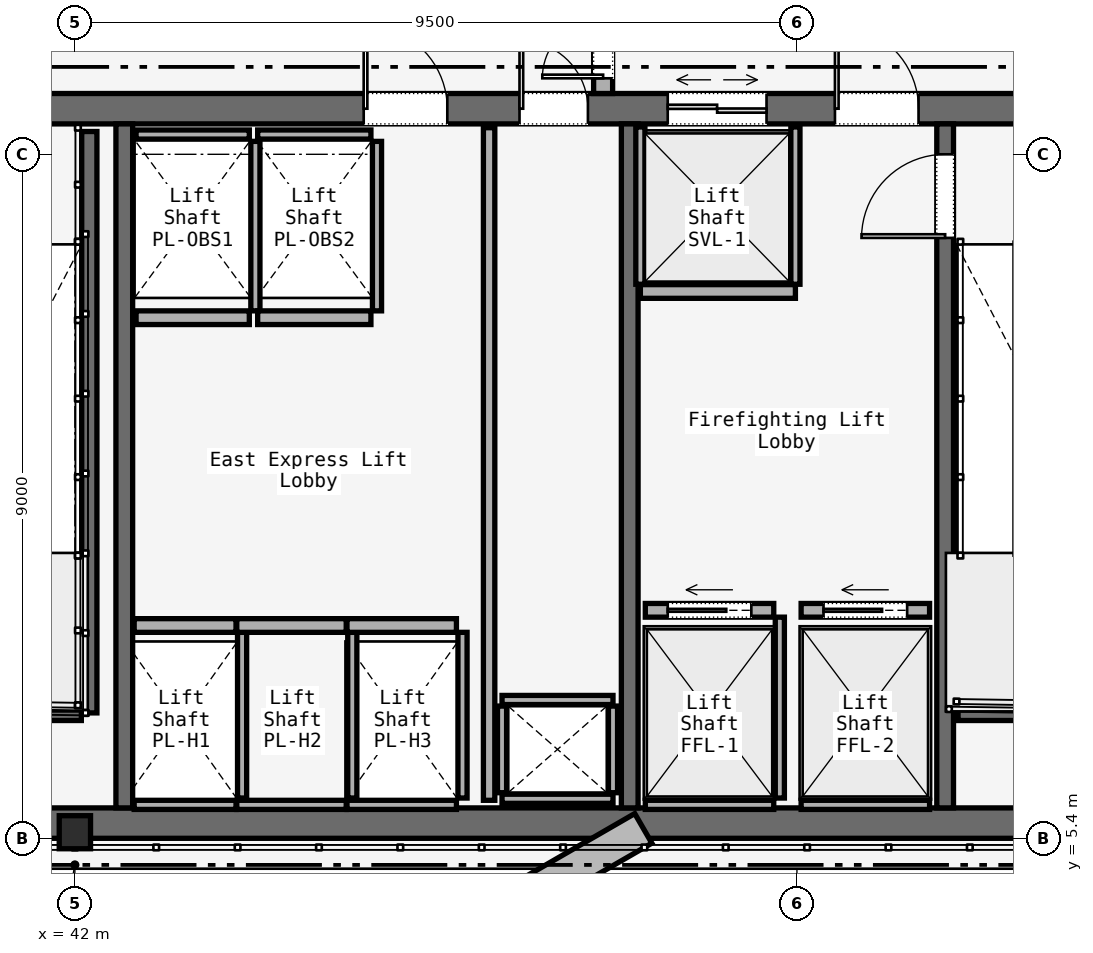
"""IFC4 building model, lengths in metres.
Left out: names, types, materials, properties, quantities, classifications, styles, units other than length and angle.
Written with IfcOpenShell. Run it as: python <this file> out.ifc"""

import sys

from ifc_helpers import new_model, si_unit, direction, frame, frame_2d, origin, origin_2d, place, context, subcontext, project, spatial, rectangle, i_section, extrude, element, fill, save


model = new_model("IFC4")
c1 = context("Model", 3, precision=1e-05, world=origin(), true_north=direction((0.0, 1.0)))
c2 = subcontext(c1, "Body", "Model", "MODEL_VIEW")
j1 = project(units=[si_unit("LENGTHUNIT", "METRE"), si_unit("PLANEANGLEUNIT", "RADIAN")], contexts=[c1])
p1 = place(None, origin())
s1 = spatial("IfcSite", under=j1, at=p1, CompositionType="ELEMENT")
p2 = place(p1, origin())
s2 = spatial("IfcBuilding", under=s1, at=p2, CompositionType="ELEMENT")
p3 = place(p2, frame((0.0, 0.0, 203.0)))
s3 = spatial("IfcBuildingStorey", under=s2, at=p3, CompositionType="ELEMENT", Elevation=203.0)
p4 = place(p3, frame((26.45, 15.0, 0.0), z_axis=(0.0, 0.0, 1.0), x_axis=(1.0, 0.0, 0.0)))
e1 = element("IfcWall", 1, at=p4, inside=s3, PredefinedType="SOLIDWALL", context=c2, shape_type="SweptSolid", body=[
    extrude(rectangle(XDim=31.1, YDim=0.4, at=frame_2d((15.55, 0.0))), origin(), (0.0, 0.0, 1.0), 5.12),
])
p5 = place(p4, frame((1.65, 0.0, 0.0)))
e2 = element("IfcOpeningElement", 2, at=p5, cuts=e1, PredefinedType="OPENING", context=c2, shape_type="SweptSolid", body=[
    extrude(rectangle(XDim=1.1, YDim=2.2, at=frame_2d((0.55, 1.1))), frame((0.0, 0.2, 0.0), z_axis=(0.0, -1.0, 0.0), x_axis=(1.0, 0.0, 0.0)), (0.0, 0.0, 1.0), 0.4),
])
p6 = place(p4, frame((13.65, 0.0, 0.0)))
e3 = element("IfcOpeningElement", 3, at=p6, cuts=e1, PredefinedType="OPENING", context=c2, shape_type="SweptSolid", body=[
    extrude(rectangle(XDim=1.1, YDim=2.2, at=frame_2d((0.55, 1.1))), frame((0.0, 0.2, 0.0), z_axis=(0.0, -1.0, 0.0), x_axis=(1.0, 0.0, 0.0)), (0.0, 0.0, 1.0), 0.4),
])
p7 = place(p4, frame((25.55, 0.0, 0.0)))
e4 = element("IfcOpeningElement", 4, at=p7, cuts=e1, PredefinedType="OPENING", context=c2, shape_type="SweptSolid", body=[
    extrude(rectangle(XDim=1.1, YDim=2.2, at=frame_2d((0.55, 1.1))), frame((0.0, 0.2, 0.0), z_axis=(0.0, -1.0, 0.0), x_axis=(1.0, 0.0, 0.0)), (0.0, 0.0, 1.0), 0.4),
])
p8 = place(p4, frame((10.7, 0.0, 0.0)))
e5 = element("IfcOpeningElement", 5, at=p8, cuts=e1, PredefinedType="OPENING", context=c2, shape_type="SweptSolid", body=[
    extrude(rectangle(XDim=1.4, YDim=2.2, at=frame_2d((0.7, 1.1))), frame((0.0, 0.2, 0.0), z_axis=(0.0, -1.0, 0.0), x_axis=(1.0, 0.0, 0.0)), (0.0, 0.0, 1.0), 0.4),
])
p9 = place(p4, frame((19.35, 0.0, 0.0)))
e6 = element("IfcOpeningElement", 6, at=p9, cuts=e1, PredefinedType="OPENING", context=c2, shape_type="SweptSolid", body=[
    extrude(rectangle(XDim=1.1, YDim=2.2, at=frame_2d((0.55, 1.1))), frame((0.0, 0.2, 0.0), z_axis=(0.0, -1.0, 0.0), x_axis=(1.0, 0.0, 0.0)), (0.0, 0.0, 1.0), 0.4),
])
p10 = place(p4, frame((21.4, 0.0, 0.0)))
e7 = element("IfcOpeningElement", 7, at=p10, cuts=e1, PredefinedType="OPENING", context=c2, shape_type="SweptSolid", body=[
    extrude(rectangle(XDim=0.9, YDim=2.1, at=frame_2d((0.45, 1.05))), frame((0.0, 0.2, 0.0), z_axis=(0.0, -1.0, 0.0), x_axis=(1.0, 0.0, 0.0)), (0.0, 0.0, 1.0), 0.4),
])
p11 = place(p4, frame((23.35, 0.0, 0.0)))
e8 = element("IfcOpeningElement", 8, at=p11, cuts=e1, PredefinedType="OPENING", context=c2, shape_type="SweptSolid", body=[
    extrude(rectangle(XDim=1.3, YDim=2.3, at=frame_2d((0.65, 1.15))), frame((0.0, 0.2, 0.0), z_axis=(0.0, -1.0, 0.0), x_axis=(1.0, 0.0, 0.0)), (0.0, 0.0, 1.0), 0.4),
])
p12 = place(p3, frame((26.45, 5.6, 0.0), z_axis=(0.0, 0.0, 1.0), x_axis=(1.0, 0.0, 0.0)))
e9 = element("IfcWall", 9, at=p12, inside=s3, PredefinedType="SOLIDWALL", context=c2, shape_type="SweptSolid", body=[
    extrude(rectangle(XDim=31.1, YDim=0.4, at=frame_2d((15.55, 0.0))), origin(), (0.0, 0.0, 1.0), 5.12),
])
for number, where, z_axis, x_axis in (
    (10, (42.65, 5.8, 0.0), (0.0, 0.0, 1.0), (0.0, 1.0, 0.0)),
    (11, (49.3, 5.8, 0.0), (0.0, 0.0, 1.0), (0.0, 1.0, 0.0)),
):
    element("IfcWall", number, at=place(p3, frame(where, z_axis=z_axis, x_axis=x_axis)), inside=s3, PredefinedType="SOLIDWALL", context=c2, shape_type="SweptSolid", body=[
        extrude(rectangle(XDim=9.0, YDim=0.22, at=frame_2d((4.5, 0.0))), origin(), (0.0, 0.0, 1.0), 5.12),
    ])
p13 = place(p3, frame((53.45, 5.8, 0.0), z_axis=(0.0, 0.0, 1.0), x_axis=(0.0, 1.0, 0.0)))
e12 = element("IfcWall", 12, at=p13, inside=s3, PredefinedType="SOLIDWALL", context=c2, shape_type="SweptSolid", body=[
    extrude(rectangle(XDim=9.0, YDim=0.22, at=frame_2d((4.5, 0.0))), origin(), (0.0, 0.0, 1.0), 5.12),
])
p14 = place(p13, frame((7.5, 0.0, 0.0)))
e13 = element("IfcOpeningElement", 13, at=p14, cuts=e12, PredefinedType="OPENING", context=c2, shape_type="SweptSolid", body=[
    extrude(rectangle(XDim=1.1, YDim=2.2, at=frame_2d((0.55, 1.1))), frame((0.0, 0.11, 0.0), z_axis=(0.0, -1.0, 0.0), x_axis=(1.0, 0.0, 0.0)), (0.0, 0.0, 1.0), 0.22),
])
p15 = place(p3, frame((42.0, 5.48, 0.0), z_axis=(0.0, 0.0, 1.0), x_axis=(1.0, 0.0, 0.0)))
e14 = element("IfcColumn", 14, at=p15, inside=s3, PredefinedType="COLUMN", context=c2, shape_type="SweptSolid", body=[
    extrude(i_section(OverallWidth=0.412, OverallDepth=0.435, WebThickness=0.036, FlangeThickness=0.044, FilletRadius=0.015, at=origin_2d()), origin(), (0.0, 0.0, 1.0), 5.12),
])
p16 = place(p3, frame((48.95, 15.2, 0.0), z_axis=(0.0, 0.0, 1.0), x_axis=(0.0, 1.0, 0.0)))
e15 = element("IfcWall", 15, at=p16, inside=s3, PredefinedType="SOLIDWALL", context=c2, shape_type="SweptSolid", body=[
    extrude(rectangle(XDim=19.8, YDim=0.25, at=frame_2d((9.9, 0.0))), origin(), (0.0, 0.0, 1.0), 3.99),
])
p17 = place(p16, frame((0.2, 0.0, 0.0)))
e16 = element("IfcOpeningElement", 16, at=p17, cuts=e15, PredefinedType="OPENING", context=c2, shape_type="SweptSolid", body=[
    extrude(rectangle(XDim=1.6, YDim=2.3, at=frame_2d((0.8, 1.15))), frame((0.0, 0.125, 0.0), z_axis=(0.0, -1.0, 0.0), x_axis=(1.0, 0.0, 0.0)), (0.0, 0.0, 1.0), 0.25),
])
p18 = place(p3, frame((42.19, 14.7, 0.0), z_axis=(0.0, 0.0, 1.0), x_axis=(0.0, -1.0, 0.0)))
e17 = element("IfcWall", 17, at=p18, inside=s3, PredefinedType="SOLIDWALL", context=c2, shape_type="SweptSolid", body=[
    extrude(rectangle(XDim=7.65, YDim=0.2, at=frame_2d((3.825, 0.0))), origin(), (0.0, 0.0, 1.0), 5.4),
])
for number, where, z_axis, x_axis in (
    (18, (38.97, 7.05, 0.0), (0.0, 0.0, 1.0), (1.0, 0.0, 0.0)),
    (19, (53.62, 7.05, 0.0), (0.0, 0.0, 1.0), (1.0, 0.0, 0.0)),
):
    element("IfcWall", number, at=place(p3, frame(where, z_axis=z_axis, x_axis=x_axis)), inside=s3, PredefinedType="SOLIDWALL", context=c2, shape_type="SweptSolid", body=[
        extrude(rectangle(XDim=3.115, YDim=0.2, at=frame_2d((1.558, 0.0))), origin(), (0.0, 0.0, 1.0), 5.4),
    ])
for number, where, z_axis, x_axis in (
    (20, (47.62, 5.92, 0.0), (0.0, 0.0, 1.0), (1.0, 0.0, 0.0)),
    (21, (47.62, 7.22, 0.0), (0.0, 0.0, 1.0), (1.0, 0.0, 0.0)),
):
    element("IfcWall", number, at=place(p3, frame(where, z_axis=z_axis, x_axis=x_axis)), inside=s3, PredefinedType="SOLIDWALL", context=c2, shape_type="SweptSolid", body=[
        extrude(rectangle(XDim=1.46, YDim=0.12, at=frame_2d((0.73, 0.0))), origin(), (0.0, 0.0, 1.0), 3.99),
    ])
for number, where, z_axis, x_axis in (
    (22, (47.62, 6.0, 0.0), (0.0, 0.0, 1.0), (0.0, 1.0, 0.0)),
    (23, (49.08, 6.0, 0.0), (0.0, 0.0, 1.0), (0.0, 1.0, 0.0)),
):
    element("IfcWall", number, at=place(p3, frame(where, z_axis=z_axis, x_axis=x_axis)), inside=s3, PredefinedType="SOLIDWALL", context=c2, shape_type="SweptSolid", body=[
        extrude(rectangle(XDim=1.14, YDim=0.12, at=frame_2d((0.57, 0.0))), origin(), (0.0, 0.0, 1.0), 3.99),
    ])
p19 = place(p3, frame((47.45, 5.9, 0.0), z_axis=(0.0, 0.0, 1.0), x_axis=(0.0, 1.0, 0.0)))
e24 = element("IfcWall", 24, at=p19, inside=s3, PredefinedType="PARTITIONING", context=c2, shape_type="SweptSolid", body=[
    extrude(rectangle(XDim=8.85, YDim=0.15, at=frame_2d((4.425, 0.0))), origin(), (0.0, 0.0, 1.0), 3.99),
])
p20 = place(p3, frame((42.78, 8.2, 0.0), z_axis=(0.0, 0.0, 1.0), x_axis=(1.0, 0.0, 0.0)))
e25 = element("IfcWall", 25, at=p20, inside=s3, PredefinedType="SOLIDWALL", context=c2, shape_type="SweptSolid", body=[
    extrude(rectangle(XDim=1.34, YDim=0.18, at=frame_2d((0.67, 0.0))), origin(), (0.0, 0.0, 1.0), 3.99),
])
p21 = place(p3, frame((42.78, 5.84, 0.0), z_axis=(0.0, 0.0, 1.0), x_axis=(1.0, 0.0, 0.0)))
e26 = element("IfcWall", 26, at=p21, inside=s3, PredefinedType="SOLIDWALL", context=c2, shape_type="SweptSolid", body=[
    extrude(rectangle(XDim=1.34, YDim=0.12, at=frame_2d((0.67, 0.0))), origin(), (0.0, 0.0, 1.0), 3.99),
])
p22 = place(p3, frame((44.2, 5.93, 0.0), z_axis=(0.0, 0.0, 1.0), x_axis=(0.0, 1.0, 0.0)))
e27 = element("IfcWall", 27, at=p22, inside=s3, PredefinedType="SOLIDWALL", context=c2, shape_type="SweptSolid", body=[
    extrude(rectangle(XDim=2.18, YDim=0.12, at=frame_2d((1.09, 0.0))), origin(), (0.0, 0.0, 1.0), 3.99),
])
p23 = place(p3, frame((44.13, 8.2, 0.0), z_axis=(0.0, 0.0, 1.0), x_axis=(1.0, 0.0, 0.0)))
e28 = element("IfcWall", 28, at=p23, inside=s3, PredefinedType="SOLIDWALL", context=c2, shape_type="SweptSolid", body=[
    extrude(rectangle(XDim=1.44, YDim=0.18, at=frame_2d((0.72, 0.0))), origin(), (0.0, 0.0, 1.0), 3.99),
])
p24 = place(p3, frame((44.13, 5.84, 0.0), z_axis=(0.0, 0.0, 1.0), x_axis=(1.0, 0.0, 0.0)))
e29 = element("IfcWall", 29, at=p24, inside=s3, PredefinedType="SOLIDWALL", context=c2, shape_type="SweptSolid", body=[
    extrude(rectangle(XDim=1.44, YDim=0.12, at=frame_2d((0.72, 0.0))), origin(), (0.0, 0.0, 1.0), 3.99),
])
p25 = place(p3, frame((45.65, 5.93, 0.0), z_axis=(0.0, 0.0, 1.0), x_axis=(0.0, 1.0, 0.0)))
e30 = element("IfcWall", 30, at=p25, inside=s3, PredefinedType="SOLIDWALL", context=c2, shape_type="SweptSolid", body=[
    extrude(rectangle(XDim=2.18, YDim=0.12, at=frame_2d((1.09, 0.0))), origin(), (0.0, 0.0, 1.0), 3.99),
])
p26 = place(p3, frame((45.58, 8.2, 0.0), z_axis=(0.0, 0.0, 1.0), x_axis=(1.0, 0.0, 0.0)))
e31 = element("IfcWall", 31, at=p26, inside=s3, PredefinedType="SOLIDWALL", context=c2, shape_type="SweptSolid", body=[
    extrude(rectangle(XDim=1.44, YDim=0.18, at=frame_2d((0.72, 0.0))), origin(), (0.0, 0.0, 1.0), 3.99),
])
p27 = place(p3, frame((45.58, 5.84, 0.0), z_axis=(0.0, 0.0, 1.0), x_axis=(1.0, 0.0, 0.0)))
e32 = element("IfcWall", 32, at=p27, inside=s3, PredefinedType="SOLIDWALL", context=c2, shape_type="SweptSolid", body=[
    extrude(rectangle(XDim=1.44, YDim=0.12, at=frame_2d((0.72, 0.0))), origin(), (0.0, 0.0, 1.0), 3.99),
])
p28 = place(p3, frame((47.1, 5.93, 0.0), z_axis=(0.0, 0.0, 1.0), x_axis=(0.0, 1.0, 0.0)))
e33 = element("IfcWall", 33, at=p28, inside=s3, PredefinedType="SOLIDWALL", context=c2, shape_type="SweptSolid", body=[
    extrude(rectangle(XDim=2.18, YDim=0.12, at=frame_2d((1.09, 0.0))), origin(), (0.0, 0.0, 1.0), 3.99),
])
p29 = place(p3, frame((42.805, 12.25, 0.0), z_axis=(0.0, 0.0, 1.0), x_axis=(1.0, 0.0, 0.0)))
e34 = element("IfcWall", 34, at=p29, inside=s3, PredefinedType="SOLIDWALL", context=c2, shape_type="SweptSolid", body=[
    extrude(rectangle(XDim=1.49, YDim=0.18, at=frame_2d((0.745, 0.0))), origin(), (0.0, 0.0, 1.0), 3.99),
])
p30 = place(p3, frame((42.805, 14.66, 0.0), z_axis=(0.0, 0.0, 1.0), x_axis=(1.0, 0.0, 0.0)))
e35 = element("IfcWall", 35, at=p30, inside=s3, PredefinedType="SOLIDWALL", context=c2, shape_type="SweptSolid", body=[
    extrude(rectangle(XDim=1.49, YDim=0.12, at=frame_2d((0.745, 0.0))), origin(), (0.0, 0.0, 1.0), 3.99),
])
p31 = place(p3, frame((44.375, 12.34, 0.0), z_axis=(0.0, 0.0, 1.0), x_axis=(0.0, 1.0, 0.0)))
e36 = element("IfcWall", 36, at=p31, inside=s3, PredefinedType="SOLIDWALL", context=c2, shape_type="SweptSolid", body=[
    extrude(rectangle(XDim=2.23, YDim=0.12, at=frame_2d((1.115, 0.0))), origin(), (0.0, 0.0, 1.0), 3.99),
])
p32 = place(p3, frame((44.405, 12.25, 0.0), z_axis=(0.0, 0.0, 1.0), x_axis=(1.0, 0.0, 0.0)))
e37 = element("IfcWall", 37, at=p32, inside=s3, PredefinedType="SOLIDWALL", context=c2, shape_type="SweptSolid", body=[
    extrude(rectangle(XDim=1.49, YDim=0.18, at=frame_2d((0.745, 0.0))), origin(), (0.0, 0.0, 1.0), 3.99),
])
p33 = place(p3, frame((44.405, 14.66, 0.0), z_axis=(0.0, 0.0, 1.0), x_axis=(1.0, 0.0, 0.0)))
e38 = element("IfcWall", 38, at=p33, inside=s3, PredefinedType="SOLIDWALL", context=c2, shape_type="SweptSolid", body=[
    extrude(rectangle(XDim=1.49, YDim=0.12, at=frame_2d((0.745, 0.0))), origin(), (0.0, 0.0, 1.0), 3.99),
])
p34 = place(p3, frame((45.975, 12.34, 0.0), z_axis=(0.0, 0.0, 1.0), x_axis=(0.0, 1.0, 0.0)))
e39 = element("IfcWall", 39, at=p34, inside=s3, PredefinedType="SOLIDWALL", context=c2, shape_type="SweptSolid", body=[
    extrude(rectangle(XDim=2.23, YDim=0.12, at=frame_2d((1.115, 0.0))), origin(), (0.0, 0.0, 1.0), 3.99),
])
p35 = place(p3, frame((49.505, 8.4, 0.0), z_axis=(0.0, 0.0, 1.0), x_axis=(1.0, 0.0, 0.0)))
e40 = element("IfcWall", 40, at=p35, inside=s3, PredefinedType="SOLIDWALL", context=c2, shape_type="SweptSolid", body=[
    extrude(rectangle(XDim=1.69, YDim=0.18, at=frame_2d((0.845, 0.0))), origin(), (0.0, 0.0, 1.0), 3.99),
])
p36 = place(p35, frame((0.295, 0.0, 0.0)))
e41 = element("IfcOpeningElement", 41, at=p36, cuts=e40, PredefinedType="OPENING", context=c2, shape_type="SweptSolid", body=[
    extrude(rectangle(XDim=1.1, YDim=2.2, at=frame_2d((0.55, 1.1))), frame((0.0, 0.09, 0.0), z_axis=(0.0, -1.0, 0.0), x_axis=(1.0, 0.0, 0.0)), (0.0, 0.0, 1.0), 0.18),
])
p37 = place(p3, frame((49.505, 5.84, 0.0), z_axis=(0.0, 0.0, 1.0), x_axis=(1.0, 0.0, 0.0)))
e42 = element("IfcWall", 42, at=p37, inside=s3, PredefinedType="SOLIDWALL", context=c2, shape_type="SweptSolid", body=[
    extrude(rectangle(XDim=1.69, YDim=0.12, at=frame_2d((0.845, 0.0))), origin(), (0.0, 0.0, 1.0), 3.99),
])
p38 = place(p3, frame((51.275, 5.93, 0.0), z_axis=(0.0, 0.0, 1.0), x_axis=(0.0, 1.0, 0.0)))
e43 = element("IfcWall", 43, at=p38, inside=s3, PredefinedType="SOLIDWALL", context=c2, shape_type="SweptSolid", body=[
    extrude(rectangle(XDim=2.38, YDim=0.12, at=frame_2d((1.19, 0.0))), origin(), (0.0, 0.0, 1.0), 3.99),
])
p39 = place(p3, frame((51.555, 8.4, 0.0), z_axis=(0.0, 0.0, 1.0), x_axis=(1.0, 0.0, 0.0)))
e44 = element("IfcWall", 44, at=p39, inside=s3, PredefinedType="SOLIDWALL", context=c2, shape_type="SweptSolid", body=[
    extrude(rectangle(XDim=1.69, YDim=0.18, at=frame_2d((0.845, 0.0))), origin(), (0.0, 0.0, 1.0), 3.99),
])
p40 = place(p39, frame((0.295, 0.0, 0.0)))
e45 = element("IfcOpeningElement", 45, at=p40, cuts=e44, PredefinedType="OPENING", context=c2, shape_type="SweptSolid", body=[
    extrude(rectangle(XDim=1.1, YDim=2.2, at=frame_2d((0.55, 1.1))), frame((0.0, 0.09, 0.0), z_axis=(0.0, -1.0, 0.0), x_axis=(1.0, 0.0, 0.0)), (0.0, 0.0, 1.0), 0.18),
])
p41 = place(p3, frame((51.555, 5.84, 0.0), z_axis=(0.0, 0.0, 1.0), x_axis=(1.0, 0.0, 0.0)))
e46 = element("IfcWall", 46, at=p41, inside=s3, PredefinedType="SOLIDWALL", context=c2, shape_type="SweptSolid", body=[
    extrude(rectangle(XDim=1.69, YDim=0.12, at=frame_2d((0.845, 0.0))), origin(), (0.0, 0.0, 1.0), 3.99),
])
p42 = place(p3, frame((49.44, 12.595, 0.0), z_axis=(0.0, 0.0, 1.0), x_axis=(1.0, 0.0, 0.0)))
e47 = element("IfcWall", 47, at=p42, inside=s3, PredefinedType="SOLIDWALL", context=c2, shape_type="SweptSolid", body=[
    extrude(rectangle(XDim=2.04, YDim=0.18, at=frame_2d((1.02, 0.0))), origin(), (0.0, 0.0, 1.0), 3.99),
])
for number, where, z_axis, x_axis in (
    (48, (49.44, 12.69, 0.0), (0.0, 0.0, 1.0), (0.0, 1.0, 0.0)),
    (49, (51.48, 12.69, 0.0), (0.0, 0.0, 1.0), (0.0, 1.0, 0.0)),
):
    element("IfcWall", number, at=place(p3, frame(where, z_axis=z_axis, x_axis=x_axis)), inside=s3, PredefinedType="SOLIDWALL", context=c2, shape_type="SweptSolid", body=[
        extrude(rectangle(XDim=2.07, YDim=0.12, at=frame_2d((1.035, 0.0))), origin(), (0.0, 0.0, 1.0), 3.99),
    ])
p43 = place(p17, origin())
e50 = element("IfcDoor", 50, at=p43, inside=s3, OperationType="DOUBLE_DOOR_SINGLE_SWING", PredefinedType="DOOR", context=c2, shape_type="SweptSolid", body=[
    extrude(rectangle(XDim=1.6, YDim=2.3, at=frame_2d((0.8, 1.15))), frame((0.0, 0.025, 0.0), z_axis=(0.0, -1.0, 0.0), x_axis=(1.0, 0.0, 0.0)), (0.0, 0.0, 1.0), 0.05),
])
fill(e16, e50)
p44 = place(p7, origin())
e51 = element("IfcDoor", 51, at=p44, inside=s3, OperationType="SINGLE_SWING_RIGHT", PredefinedType="DOOR", context=c2, shape_type="SweptSolid", body=[
    extrude(rectangle(XDim=1.1, YDim=2.2, at=frame_2d((0.55, 1.1))), frame((0.0, 0.025, 0.0), z_axis=(0.0, -1.0, 0.0), x_axis=(1.0, 0.0, 0.0)), (0.0, 0.0, 1.0), 0.05),
])
fill(e4, e51)
p45 = place(p9, origin())
e52 = element("IfcDoor", 52, at=p45, inside=s3, OperationType="SINGLE_SWING_LEFT", PredefinedType="DOOR", context=c2, shape_type="SweptSolid", body=[
    extrude(rectangle(XDim=1.1, YDim=2.2, at=frame_2d((0.55, 1.1))), frame((0.0, 0.025, 0.0), z_axis=(0.0, -1.0, 0.0), x_axis=(1.0, 0.0, 0.0)), (0.0, 0.0, 1.0), 0.05),
])
fill(e6, e52)
p46 = place(p10, origin())
e53 = element("IfcDoor", 53, at=p46, inside=s3, OperationType="SINGLE_SWING_LEFT", PredefinedType="DOOR", context=c2, shape_type="SweptSolid", body=[
    extrude(rectangle(XDim=0.9, YDim=2.1, at=frame_2d((0.45, 1.05))), frame((0.0, 0.025, 0.0), z_axis=(0.0, -1.0, 0.0), x_axis=(1.0, 0.0, 0.0)), (0.0, 0.0, 1.0), 0.05),
])
fill(e7, e53)
p47 = place(p14, origin())
e54 = element("IfcDoor", 54, at=p47, inside=s3, OperationType="SINGLE_SWING_LEFT", PredefinedType="DOOR", context=c2, shape_type="SweptSolid", body=[
    extrude(rectangle(XDim=1.1, YDim=2.2, at=frame_2d((0.55, 1.1))), frame((0.0, 0.025, 0.0), z_axis=(0.0, -1.0, 0.0), x_axis=(1.0, 0.0, 0.0)), (0.0, 0.0, 1.0), 0.05),
])
fill(e13, e54)
p48 = place(p36, origin())
e55 = element("IfcDoor", 55, at=p48, inside=s3, OperationType="SLIDING_TO_LEFT", PredefinedType="DOOR", context=c2, shape_type="SweptSolid", body=[
    extrude(rectangle(XDim=1.1, YDim=2.2, at=frame_2d((0.55, 1.1))), frame((0.0, 0.025, 0.0), z_axis=(0.0, -1.0, 0.0), x_axis=(1.0, 0.0, 0.0)), (0.0, 0.0, 1.0), 0.05),
])
fill(e41, e55)
p49 = place(p40, origin())
e56 = element("IfcDoor", 56, at=p49, inside=s3, OperationType="SLIDING_TO_LEFT", PredefinedType="DOOR", context=c2, shape_type="SweptSolid", body=[
    extrude(rectangle(XDim=1.1, YDim=2.2, at=frame_2d((0.55, 1.1))), frame((0.0, 0.025, 0.0), z_axis=(0.0, -1.0, 0.0), x_axis=(1.0, 0.0, 0.0)), (0.0, 0.0, 1.0), 0.05),
])
fill(e45, e56)
p50 = place(p11, origin())
e57 = element("IfcDoor", 57, at=p50, inside=s3, OperationType="DOUBLE_DOOR_SLIDING", PredefinedType="DOOR", context=c2, shape_type="SweptSolid", body=[
    extrude(rectangle(XDim=1.3, YDim=2.3, at=frame_2d((0.65, 1.15))), frame((0.0, 0.025, 0.0), z_axis=(0.0, -1.0, 0.0), x_axis=(1.0, 0.0, 0.0)), (0.0, 0.0, 1.0), 0.05),
])
fill(e8, e57)
save(model, sys.argv[1])
